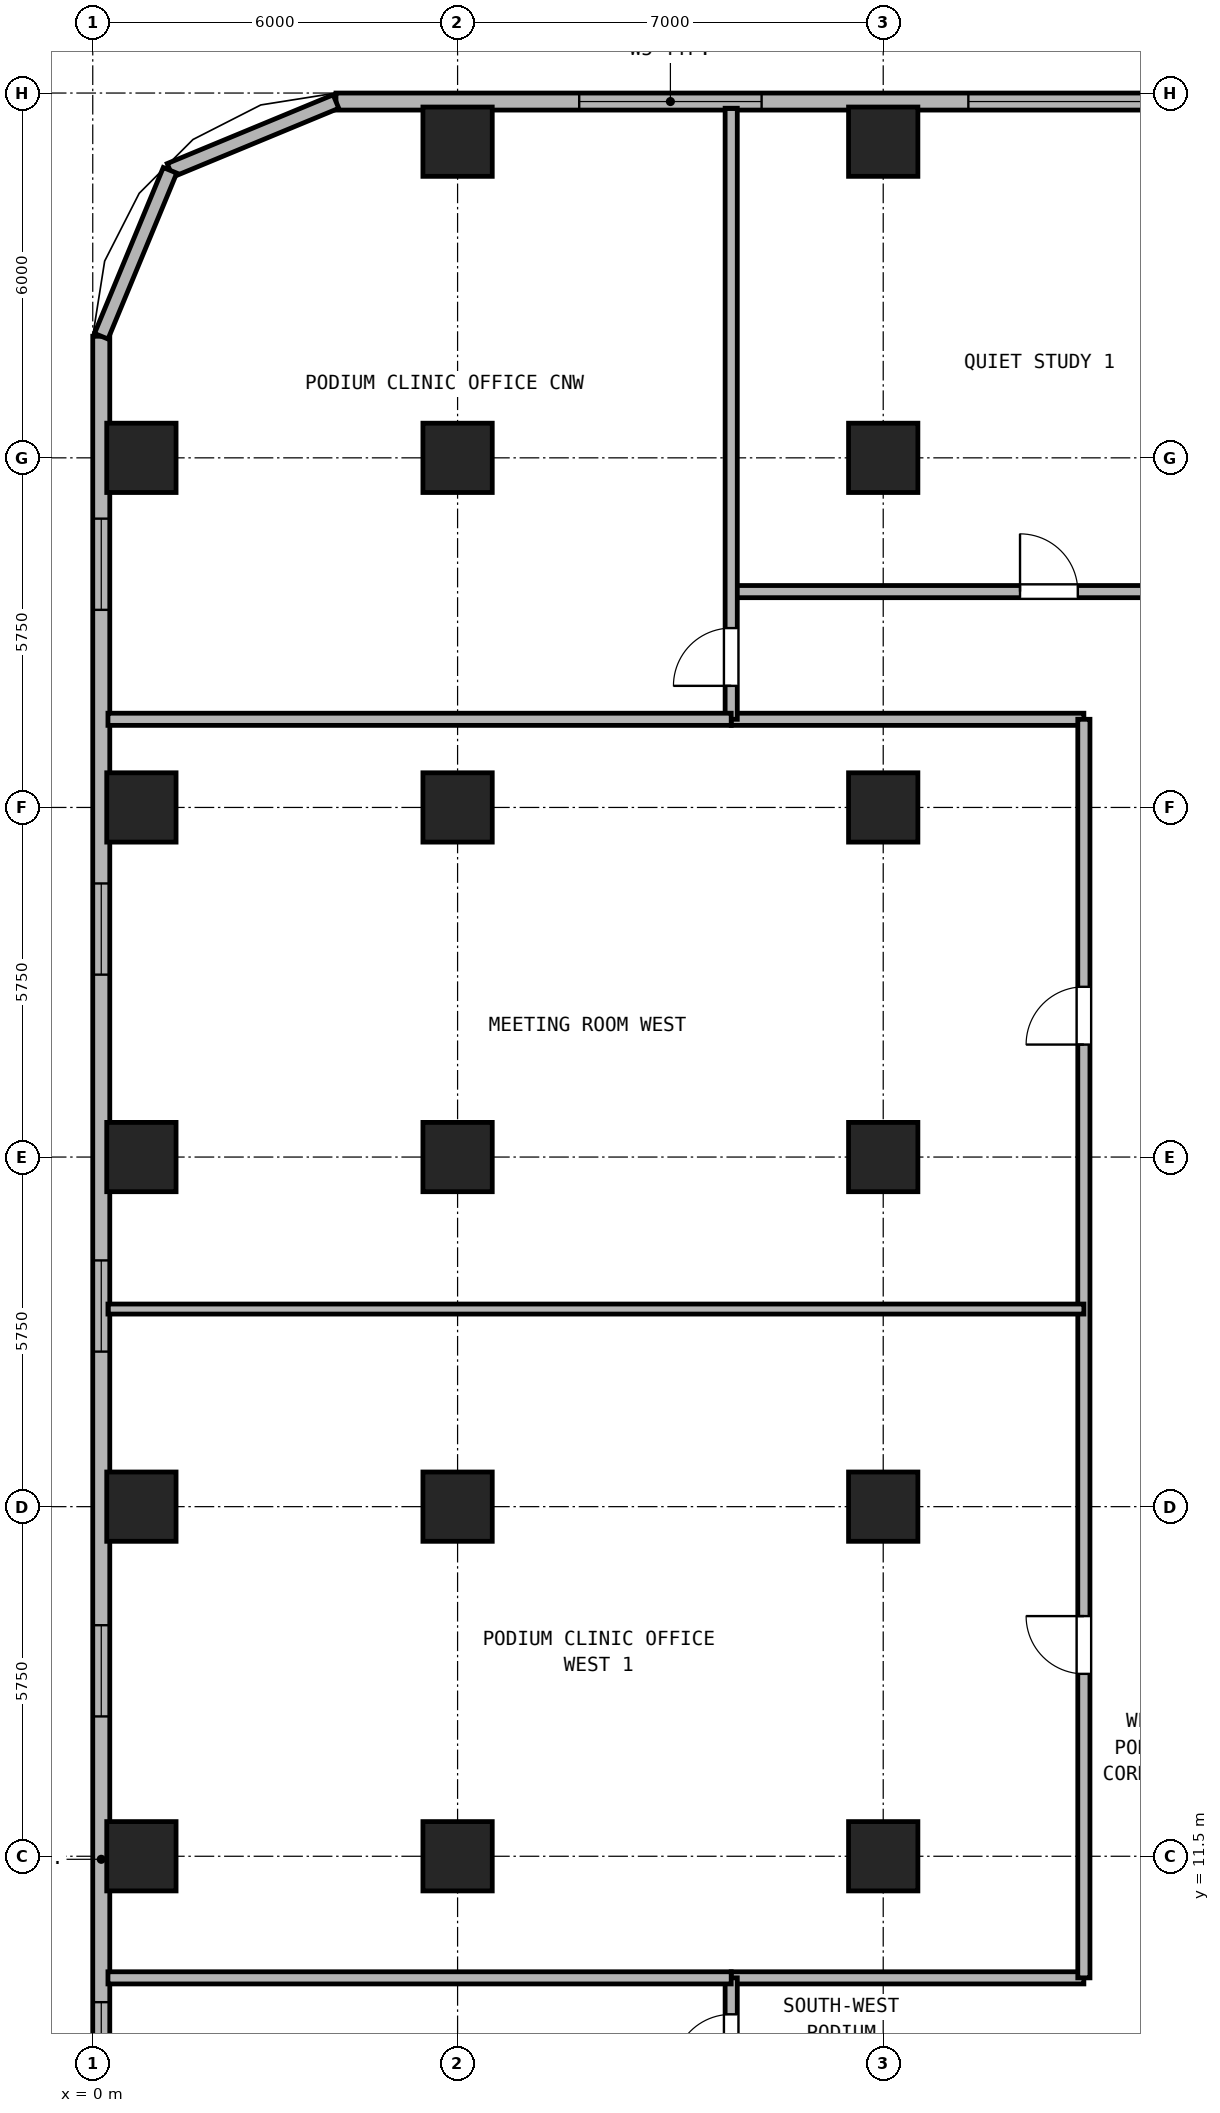
"""IFC4 building model, lengths in metres.
Left out: names, types, materials, properties, quantities, classifications, styles, units other than length and angle.
Written with IfcOpenShell. Run it as: python <this file> out.ifc"""

import sys

from ifc_helpers import new_model, si_unit, direction, frame, frame_2d, origin, origin_2d, place, context, subcontext, project, spatial, rectangle, hollow_rectangle, extrude, source, transform, mapped, element, fill, save


model = new_model("IFC4")
c1 = context("Model", 3, precision=1e-05, world=origin(), true_north=direction((0.0, 1.0)))
c2 = subcontext(c1, "Body", "Model", "MODEL_VIEW")
j1 = project(units=[si_unit("LENGTHUNIT", "METRE"), si_unit("PLANEANGLEUNIT", "RADIAN")], contexts=[c1])
p1 = place(None, origin())
s1 = spatial("IfcSite", under=j1, at=p1, CompositionType="ELEMENT")
p2 = place(p1, origin())
s2 = spatial("IfcBuilding", under=s1, at=p2, CompositionType="ELEMENT")
p3 = place(p2, frame((0.0, 0.0, 13.5)))
s3 = spatial("IfcBuildingStorey", under=s2, at=p3, CompositionType="ELEMENT", Elevation=13.5)
m1 = source(origin(), c2, "Body", "SweptSolid", [
    extrude(hollow_rectangle(XDim=1.14, YDim=1.14, WallThickness=0.07, at=origin_2d()), origin(), (0.0, 0.0, 1.0), 4.18),
])
for number, where, z_axis, x_axis in (
    (1, (6.0, 39.7, 0.0), (0.0, 0.0, 1.0), (1.0, 0.0, 0.0)),
    (2, (13.0, 39.7, 0.0), (0.0, 0.0, 1.0), (1.0, 0.0, 0.0)),
    (3, (0.8, 11.5, 0.0), (0.0, 0.0, 1.0), (1.0, 0.0, 0.0)),
    (4, (0.8, 17.25, 0.0), (0.0, 0.0, 1.0), (1.0, 0.0, 0.0)),
    (5, (0.8, 23.0, 0.0), (0.0, 0.0, 1.0), (1.0, 0.0, 0.0)),
    (6, (0.8, 28.75, 0.0), (0.0, 0.0, 1.0), (1.0, 0.0, 0.0)),
    (7, (0.8, 34.5, 0.0), (0.0, 0.0, 1.0), (1.0, 0.0, 0.0)),
    (8, (6.0, 11.5, 0.0), (0.0, 0.0, 1.0), (1.0, 0.0, 0.0)),
    (9, (6.0, 17.25, 0.0), (0.0, 0.0, 1.0), (1.0, 0.0, 0.0)),
    (10, (6.0, 23.0, 0.0), (0.0, 0.0, 1.0), (1.0, 0.0, 0.0)),
    (11, (6.0, 28.75, 0.0), (0.0, 0.0, 1.0), (1.0, 0.0, 0.0)),
    (12, (6.0, 34.5, 0.0), (0.0, 0.0, 1.0), (1.0, 0.0, 0.0)),
    (13, (13.0, 11.5, 0.0), (0.0, 0.0, 1.0), (1.0, 0.0, 0.0)),
    (14, (13.0, 17.25, 0.0), (0.0, 0.0, 1.0), (1.0, 0.0, 0.0)),
    (15, (13.0, 23.0, 0.0), (0.0, 0.0, 1.0), (1.0, 0.0, 0.0)),
    (16, (13.0, 28.75, 0.0), (0.0, 0.0, 1.0), (1.0, 0.0, 0.0)),
    (17, (13.0, 34.5, 0.0), (0.0, 0.0, 1.0), (1.0, 0.0, 0.0)),
):
    element("IfcColumn", number, at=place(p3, frame(where, z_axis=z_axis, x_axis=x_axis)), inside=s3, PredefinedType="COLUMN", context=c2, shape_type="MappedRepresentation", body=[
        mapped(m1, transform((0.0, 0.0, 0.0), x_axis=(1.0, 0.0, 0.0), y_axis=(0.0, 1.0, 0.0), z_axis=(0.0, 0.0, 1.0), scale=1.0)),
    ])
p4 = place(p3, frame((0.14, 4.0, 0.0), z_axis=(0.0, 0.0, 1.0), x_axis=(0.0, 1.0, 0.0)))
e18 = element("IfcWall", 18, at=p4, inside=s3, PredefinedType="SOLIDWALL", context=c2, shape_type="SweptSolid", body=[
    extrude(rectangle(XDim=32.5, YDim=0.28, at=frame_2d((16.25, 0.0))), origin(), (0.0, 0.0, 1.0), 4.18),
])
p5 = place(p4, frame((3.6, 0.0, 0.9)))
e19 = element("IfcOpeningElement", 19, at=p5, cuts=e18, PredefinedType="OPENING", context=c2, shape_type="SweptSolid", body=[
    extrude(rectangle(XDim=1.5, YDim=1.8, at=frame_2d((0.75, 0.9))), frame((0.0, 0.15, 0.0), z_axis=(0.0, -1.0, 0.0), x_axis=(1.0, 0.0, 0.0)), (0.0, 0.0, 1.0), 0.3),
])
p6 = place(p4, frame((9.8, 0.0, 0.9)))
e20 = element("IfcOpeningElement", 20, at=p6, cuts=e18, PredefinedType="OPENING", context=c2, shape_type="SweptSolid", body=[
    extrude(rectangle(XDim=1.5, YDim=1.8, at=frame_2d((0.75, 0.9))), frame((0.0, 0.15, 0.0), z_axis=(0.0, -1.0, 0.0), x_axis=(1.0, 0.0, 0.0)), (0.0, 0.0, 1.0), 0.3),
])
p7 = place(p4, frame((15.8, 0.0, 0.9)))
e21 = element("IfcOpeningElement", 21, at=p7, cuts=e18, PredefinedType="OPENING", context=c2, shape_type="SweptSolid", body=[
    extrude(rectangle(XDim=1.5, YDim=1.8, at=frame_2d((0.75, 0.9))), frame((0.0, 0.15, 0.0), z_axis=(0.0, -1.0, 0.0), x_axis=(1.0, 0.0, 0.0)), (0.0, 0.0, 1.0), 0.3),
])
p8 = place(p4, frame((22.0, 0.0, 0.9)))
e22 = element("IfcOpeningElement", 22, at=p8, cuts=e18, PredefinedType="OPENING", context=c2, shape_type="SweptSolid", body=[
    extrude(rectangle(XDim=1.5, YDim=1.8, at=frame_2d((0.75, 0.9))), frame((0.0, 0.15, 0.0), z_axis=(0.0, -1.0, 0.0), x_axis=(1.0, 0.0, 0.0)), (0.0, 0.0, 1.0), 0.3),
])
p9 = place(p4, frame((28.0, 0.0, 0.9)))
e23 = element("IfcOpeningElement", 23, at=p9, cuts=e18, PredefinedType="OPENING", context=c2, shape_type="SweptSolid", body=[
    extrude(rectangle(XDim=1.5, YDim=1.8, at=frame_2d((0.75, 0.9))), frame((0.0, 0.15, 0.0), z_axis=(0.0, -1.0, 0.0), x_axis=(1.0, 0.0, 0.0)), (0.0, 0.0, 1.0), 0.3),
])
p10 = place(p3, frame((4.0, 40.36, 0.0), z_axis=(0.0, 0.0, 1.0), x_axis=(1.0, 0.0, 0.0)))
e24 = element("IfcWall", 24, at=p10, inside=s3, PredefinedType="SOLIDWALL", context=c2, shape_type="SweptSolid", body=[
    extrude(rectangle(XDim=39.0, YDim=0.28, at=frame_2d((19.5, 0.0))), origin(), (0.0, 0.0, 1.0), 4.18),
])
p11 = place(p10, frame((4.0, 0.0, 0.9)))
e25 = element("IfcOpeningElement", 25, at=p11, cuts=e24, PredefinedType="OPENING", context=c2, shape_type="SweptSolid", body=[
    extrude(rectangle(XDim=3.0, YDim=2.25, at=frame_2d((1.5, 1.125))), frame((0.0, 0.15, 0.0), z_axis=(0.0, -1.0, 0.0), x_axis=(1.0, 0.0, 0.0)), (0.0, 0.0, 1.0), 0.3),
])
p12 = place(p10, frame((10.4, 0.0, 0.9)))
e26 = element("IfcOpeningElement", 26, at=p12, cuts=e24, PredefinedType="OPENING", context=c2, shape_type="SweptSolid", body=[
    extrude(rectangle(XDim=3.0, YDim=2.25, at=frame_2d((1.5, 1.125))), frame((0.0, 0.15, 0.0), z_axis=(0.0, -1.0, 0.0), x_axis=(1.0, 0.0, 0.0)), (0.0, 0.0, 1.0), 0.3),
])
p13 = place(p10, frame((19.5, 0.0, 0.9)))
e27 = element("IfcOpeningElement", 27, at=p13, cuts=e24, PredefinedType="OPENING", context=c2, shape_type="SweptSolid", body=[
    extrude(rectangle(XDim=3.0, YDim=2.25, at=frame_2d((1.5, 1.125))), frame((0.0, 0.15, 0.0), z_axis=(0.0, -1.0, 0.0), x_axis=(1.0, 0.0, 0.0)), (0.0, 0.0, 1.0), 0.3),
])
p14 = place(p10, frame((25.8, 0.0, 0.9)))
e28 = element("IfcOpeningElement", 28, at=p14, cuts=e24, PredefinedType="OPENING", context=c2, shape_type="SweptSolid", body=[
    extrude(rectangle(XDim=3.0, YDim=2.25, at=frame_2d((1.5, 1.125))), frame((0.0, 0.15, 0.0), z_axis=(0.0, -1.0, 0.0), x_axis=(1.0, 0.0, 0.0)), (0.0, 0.0, 1.0), 0.3),
])
p15 = place(p10, frame((32.8, 0.0, 0.9)))
e29 = element("IfcOpeningElement", 29, at=p15, cuts=e24, PredefinedType="OPENING", context=c2, shape_type="SweptSolid", body=[
    extrude(rectangle(XDim=3.0, YDim=2.25, at=frame_2d((1.5, 1.125))), frame((0.0, 0.15, 0.0), z_axis=(0.0, -1.0, 0.0), x_axis=(1.0, 0.0, 0.0)), (0.0, 0.0, 1.0), 0.3),
])
for number, where, z_axis, x_axis in (
    (30, (4.0, 40.36, 0.0), (0.0, 0.0, 1.0), (-0.924, -0.383, 0.0)),
    (31, (1.271, 39.229, 0.0), (0.0, 0.0, 1.0), (-0.383, -0.924, 0.0)),
):
    element("IfcWall", number, at=place(p3, frame(where, z_axis=z_axis, x_axis=x_axis)), inside=s3, PredefinedType="SOLIDWALL", context=c2, shape_type="SweptSolid", body=[
        extrude(rectangle(XDim=2.954, YDim=0.24, at=frame_2d((1.477, 0.0))), origin(), (0.0, 0.0, 1.0), 4.18),
    ])
p16 = place(p3, frame((10.5, 32.3, 0.0), z_axis=(0.0, 0.0, 1.0), x_axis=(1.0, 0.0, 0.0)))
e32 = element("IfcWall", 32, at=p16, inside=s3, PredefinedType="PARTITIONING", context=c2, shape_type="SweptSolid", body=[
    extrude(rectangle(XDim=26.0, YDim=0.2, at=frame_2d((13.0, 0.0))), origin(), (0.0, 0.0, 1.0), 4.18),
])
p17 = place(p16, frame((4.75, 0.0, 0.0)))
e33 = element("IfcOpeningElement", 33, at=p17, cuts=e32, PredefinedType="OPENING", context=c2, shape_type="SweptSolid", body=[
    extrude(rectangle(XDim=0.95, YDim=2.15, at=frame_2d((0.475, 1.075))), frame((0.0, 0.11, 0.0), z_axis=(0.0, -1.0, 0.0), x_axis=(1.0, 0.0, 0.0)), (0.0, 0.0, 1.0), 0.22),
])
p18 = place(p16, frame((14.0, 0.0, 0.0)))
e34 = element("IfcOpeningElement", 34, at=p18, cuts=e32, PredefinedType="OPENING", context=c2, shape_type="SweptSolid", body=[
    extrude(rectangle(XDim=0.95, YDim=2.15, at=frame_2d((0.475, 1.075))), frame((0.0, 0.11, 0.0), z_axis=(0.0, -1.0, 0.0), x_axis=(1.0, 0.0, 0.0)), (0.0, 0.0, 1.0), 0.22),
])
p19 = place(p16, frame((21.75, 0.0, 0.0)))
e35 = element("IfcOpeningElement", 35, at=p19, cuts=e32, PredefinedType="OPENING", context=c2, shape_type="SweptSolid", body=[
    extrude(rectangle(XDim=0.95, YDim=2.15, at=frame_2d((0.475, 1.075))), frame((0.0, 0.11, 0.0), z_axis=(0.0, -1.0, 0.0), x_axis=(1.0, 0.0, 0.0)), (0.0, 0.0, 1.0), 0.22),
])
for number, where, z_axis, x_axis in (
    (36, (10.5, 9.5, 0.0), (0.0, 0.0, 1.0), (1.0, 0.0, 0.0)),
    (37, (10.5, 30.2, 0.0), (0.0, 0.0, 1.0), (1.0, 0.0, 0.0)),
):
    element("IfcWall", number, at=place(p3, frame(where, z_axis=z_axis, x_axis=x_axis)), inside=s3, PredefinedType="PARTITIONING", context=c2, shape_type="SweptSolid", body=[
        extrude(rectangle(XDim=5.8, YDim=0.2, at=frame_2d((2.9, 0.0))), origin(), (0.0, 0.0, 1.0), 4.18),
    ])
p20 = place(p3, frame((16.3, 9.5, 0.0), z_axis=(0.0, 0.0, 1.0), x_axis=(0.0, 1.0, 0.0)))
e38 = element("IfcWall", 38, at=p20, inside=s3, PredefinedType="PARTITIONING", context=c2, shape_type="SweptSolid", body=[
    extrude(rectangle(XDim=20.7, YDim=0.2, at=frame_2d((10.35, 0.0))), origin(), (0.0, 0.0, 1.0), 4.18),
])
p21 = place(p20, frame((5.0, 0.0, 0.0)))
e39 = element("IfcOpeningElement", 39, at=p21, cuts=e38, PredefinedType="OPENING", context=c2, shape_type="SweptSolid", body=[
    extrude(rectangle(XDim=0.95, YDim=2.15, at=frame_2d((0.475, 1.075))), frame((0.0, 0.11, 0.0), z_axis=(0.0, -1.0, 0.0), x_axis=(1.0, 0.0, 0.0)), (0.0, 0.0, 1.0), 0.22),
])
p22 = place(p20, frame((15.35, 0.0, 0.0)))
e40 = element("IfcOpeningElement", 40, at=p22, cuts=e38, PredefinedType="OPENING", context=c2, shape_type="SweptSolid", body=[
    extrude(rectangle(XDim=0.95, YDim=2.15, at=frame_2d((0.475, 1.075))), frame((0.0, 0.11, 0.0), z_axis=(0.0, -1.0, 0.0), x_axis=(1.0, 0.0, 0.0)), (0.0, 0.0, 1.0), 0.22),
])
p23 = place(p3, frame((10.5, 0.25, 0.0), z_axis=(0.0, 0.0, 1.0), x_axis=(0.0, 1.0, 0.0)))
e41 = element("IfcWall", 41, at=p23, inside=s3, PredefinedType="PARTITIONING", context=c2, shape_type="SweptSolid", body=[
    extrude(rectangle(XDim=9.25, YDim=0.2, at=frame_2d((4.625, 0.0))), origin(), (0.0, 0.0, 1.0), 4.18),
])
p24 = place(p23, frame((7.7, 0.0, 0.0)))
e42 = element("IfcOpeningElement", 42, at=p24, cuts=e41, PredefinedType="OPENING", context=c2, shape_type="SweptSolid", body=[
    extrude(rectangle(XDim=0.95, YDim=2.15, at=frame_2d((0.475, 1.075))), frame((0.0, 0.11, 0.0), z_axis=(0.0, -1.0, 0.0), x_axis=(1.0, 0.0, 0.0)), (0.0, 0.0, 1.0), 0.22),
])
p25 = place(p3, frame((10.5, 30.2, 0.0), z_axis=(0.0, 0.0, 1.0), x_axis=(0.0, 1.0, 0.0)))
e43 = element("IfcWall", 43, at=p25, inside=s3, PredefinedType="PARTITIONING", context=c2, shape_type="SweptSolid", body=[
    extrude(rectangle(XDim=10.05, YDim=0.2, at=frame_2d((5.025, 0.0))), origin(), (0.0, 0.0, 1.0), 4.18),
])
p26 = place(p25, frame((0.55, 0.0, 0.0)))
e44 = element("IfcOpeningElement", 44, at=p26, cuts=e43, PredefinedType="OPENING", context=c2, shape_type="SweptSolid", body=[
    extrude(rectangle(XDim=0.95, YDim=2.15, at=frame_2d((0.475, 1.075))), frame((0.0, 0.11, 0.0), z_axis=(0.0, -1.0, 0.0), x_axis=(1.0, 0.0, 0.0)), (0.0, 0.0, 1.0), 0.22),
])
for number, where, z_axis, x_axis in (
    (45, (0.25, 9.5, 0.0), (0.0, 0.0, 1.0), (1.0, 0.0, 0.0)),
    (46, (0.25, 30.2, 0.0), (0.0, 0.0, 1.0), (1.0, 0.0, 0.0)),
):
    element("IfcWall", number, at=place(p3, frame(where, z_axis=z_axis, x_axis=x_axis)), inside=s3, PredefinedType="PARTITIONING", context=c2, shape_type="SweptSolid", body=[
        extrude(rectangle(XDim=10.25, YDim=0.2, at=frame_2d((5.125, 0.0))), origin(), (0.0, 0.0, 1.0), 4.18),
    ])
p27 = place(p3, frame((0.25, 20.5, 0.0), z_axis=(0.0, 0.0, 1.0), x_axis=(1.0, 0.0, 0.0)))
e47 = element("IfcWall", 47, at=p27, inside=s3, PredefinedType="PARTITIONING", context=c2, shape_type="SweptSolid", body=[
    extrude(rectangle(XDim=16.05, YDim=0.165, at=frame_2d((8.025, 0.0))), origin(), (0.0, 0.0, 1.0), 4.18),
])
p28 = place(p5, origin())
e48 = element("IfcWindow", 48, at=p28, inside=s3, PartitioningType="SINGLE_PANEL", PredefinedType="WINDOW", context=c2, shape_type="SweptSolid", body=[
    extrude(rectangle(XDim=1.5, YDim=1.8, at=frame_2d((0.75, 0.9))), frame((0.0, 0.03, 0.0), z_axis=(0.0, -1.0, 0.0), x_axis=(1.0, 0.0, 0.0)), (0.0, 0.0, 1.0), 0.06),
])
fill(e19, e48)
p29 = place(p6, origin())
e49 = element("IfcWindow", 49, at=p29, inside=s3, PartitioningType="SINGLE_PANEL", PredefinedType="WINDOW", context=c2, shape_type="SweptSolid", body=[
    extrude(rectangle(XDim=1.5, YDim=1.8, at=frame_2d((0.75, 0.9))), frame((0.0, 0.03, 0.0), z_axis=(0.0, -1.0, 0.0), x_axis=(1.0, 0.0, 0.0)), (0.0, 0.0, 1.0), 0.06),
])
fill(e20, e49)
p30 = place(p7, origin())
e50 = element("IfcWindow", 50, at=p30, inside=s3, PartitioningType="SINGLE_PANEL", PredefinedType="WINDOW", context=c2, shape_type="SweptSolid", body=[
    extrude(rectangle(XDim=1.5, YDim=1.8, at=frame_2d((0.75, 0.9))), frame((0.0, 0.03, 0.0), z_axis=(0.0, -1.0, 0.0), x_axis=(1.0, 0.0, 0.0)), (0.0, 0.0, 1.0), 0.06),
])
fill(e21, e50)
p31 = place(p8, origin())
e51 = element("IfcWindow", 51, at=p31, inside=s3, PartitioningType="SINGLE_PANEL", PredefinedType="WINDOW", context=c2, shape_type="SweptSolid", body=[
    extrude(rectangle(XDim=1.5, YDim=1.8, at=frame_2d((0.75, 0.9))), frame((0.0, 0.03, 0.0), z_axis=(0.0, -1.0, 0.0), x_axis=(1.0, 0.0, 0.0)), (0.0, 0.0, 1.0), 0.06),
])
fill(e22, e51)
p32 = place(p9, origin())
e52 = element("IfcWindow", 52, at=p32, inside=s3, PartitioningType="SINGLE_PANEL", PredefinedType="WINDOW", context=c2, shape_type="SweptSolid", body=[
    extrude(rectangle(XDim=1.5, YDim=1.8, at=frame_2d((0.75, 0.9))), frame((0.0, 0.03, 0.0), z_axis=(0.0, -1.0, 0.0), x_axis=(1.0, 0.0, 0.0)), (0.0, 0.0, 1.0), 0.06),
])
fill(e23, e52)
p33 = place(p11, origin())
e53 = element("IfcWindow", 53, at=p33, inside=s3, PartitioningType="SINGLE_PANEL", PredefinedType="WINDOW", context=c2, shape_type="SweptSolid", body=[
    extrude(rectangle(XDim=3.0, YDim=2.25, at=frame_2d((1.5, 1.125))), frame((0.0, 0.03, 0.0), z_axis=(0.0, -1.0, 0.0), x_axis=(1.0, 0.0, 0.0)), (0.0, 0.0, 1.0), 0.06),
])
fill(e25, e53)
p34 = place(p12, origin())
e54 = element("IfcWindow", 54, at=p34, inside=s3, PartitioningType="SINGLE_PANEL", PredefinedType="WINDOW", context=c2, shape_type="SweptSolid", body=[
    extrude(rectangle(XDim=3.0, YDim=2.25, at=frame_2d((1.5, 1.125))), frame((0.0, 0.03, 0.0), z_axis=(0.0, -1.0, 0.0), x_axis=(1.0, 0.0, 0.0)), (0.0, 0.0, 1.0), 0.06),
])
fill(e26, e54)
p35 = place(p17, origin())
e55 = element("IfcDoor", 55, at=p35, inside=s3, OperationType="SINGLE_SWING_LEFT", PredefinedType="DOOR", context=c2, shape_type="SweptSolid", body=[
    extrude(rectangle(XDim=0.95, YDim=2.15, at=frame_2d((0.475, 1.075))), frame((0.0, 0.025, 0.0), z_axis=(0.0, -1.0, 0.0), x_axis=(1.0, 0.0, 0.0)), (0.0, 0.0, 1.0), 0.05),
])
fill(e33, e55)
p36 = place(p24, frame((0.95, 0.0, 0.0), z_axis=(0.0, 0.0, 1.0), x_axis=(-1.0, 0.0, 0.0)))
e56 = element("IfcDoor", 56, at=p36, inside=s3, OperationType="SINGLE_SWING_LEFT", PredefinedType="DOOR", context=c2, shape_type="SweptSolid", body=[
    extrude(rectangle(XDim=0.95, YDim=2.15, at=frame_2d((0.475, 1.075))), frame((0.0, 0.025, 0.0), z_axis=(0.0, -1.0, 0.0), x_axis=(1.0, 0.0, 0.0)), (0.0, 0.0, 1.0), 0.05),
])
fill(e42, e56)
p37 = place(p26, frame((0.95, 0.0, 0.0), z_axis=(0.0, 0.0, 1.0), x_axis=(-1.0, 0.0, 0.0)))
e57 = element("IfcDoor", 57, at=p37, inside=s3, OperationType="SINGLE_SWING_LEFT", PredefinedType="DOOR", context=c2, shape_type="SweptSolid", body=[
    extrude(rectangle(XDim=0.95, YDim=2.15, at=frame_2d((0.475, 1.075))), frame((0.0, 0.025, 0.0), z_axis=(0.0, -1.0, 0.0), x_axis=(1.0, 0.0, 0.0)), (0.0, 0.0, 1.0), 0.05),
])
fill(e44, e57)
p38 = place(p21, frame((0.95, 0.0, 0.0), z_axis=(0.0, 0.0, 1.0), x_axis=(-1.0, 0.0, 0.0)))
e58 = element("IfcDoor", 58, at=p38, inside=s3, OperationType="SINGLE_SWING_RIGHT", PredefinedType="DOOR", context=c2, shape_type="SweptSolid", body=[
    extrude(rectangle(XDim=0.95, YDim=2.15, at=frame_2d((0.475, 1.075))), frame((0.0, 0.025, 0.0), z_axis=(0.0, -1.0, 0.0), x_axis=(1.0, 0.0, 0.0)), (0.0, 0.0, 1.0), 0.05),
])
fill(e39, e58)
p39 = place(p22, frame((0.95, 0.0, 0.0), z_axis=(0.0, 0.0, 1.0), x_axis=(-1.0, 0.0, 0.0)))
e59 = element("IfcDoor", 59, at=p39, inside=s3, OperationType="SINGLE_SWING_LEFT", PredefinedType="DOOR", context=c2, shape_type="SweptSolid", body=[
    extrude(rectangle(XDim=0.95, YDim=2.15, at=frame_2d((0.475, 1.075))), frame((0.0, 0.025, 0.0), z_axis=(0.0, -1.0, 0.0), x_axis=(1.0, 0.0, 0.0)), (0.0, 0.0, 1.0), 0.05),
])
fill(e40, e59)
save(model, sys.argv[1])
